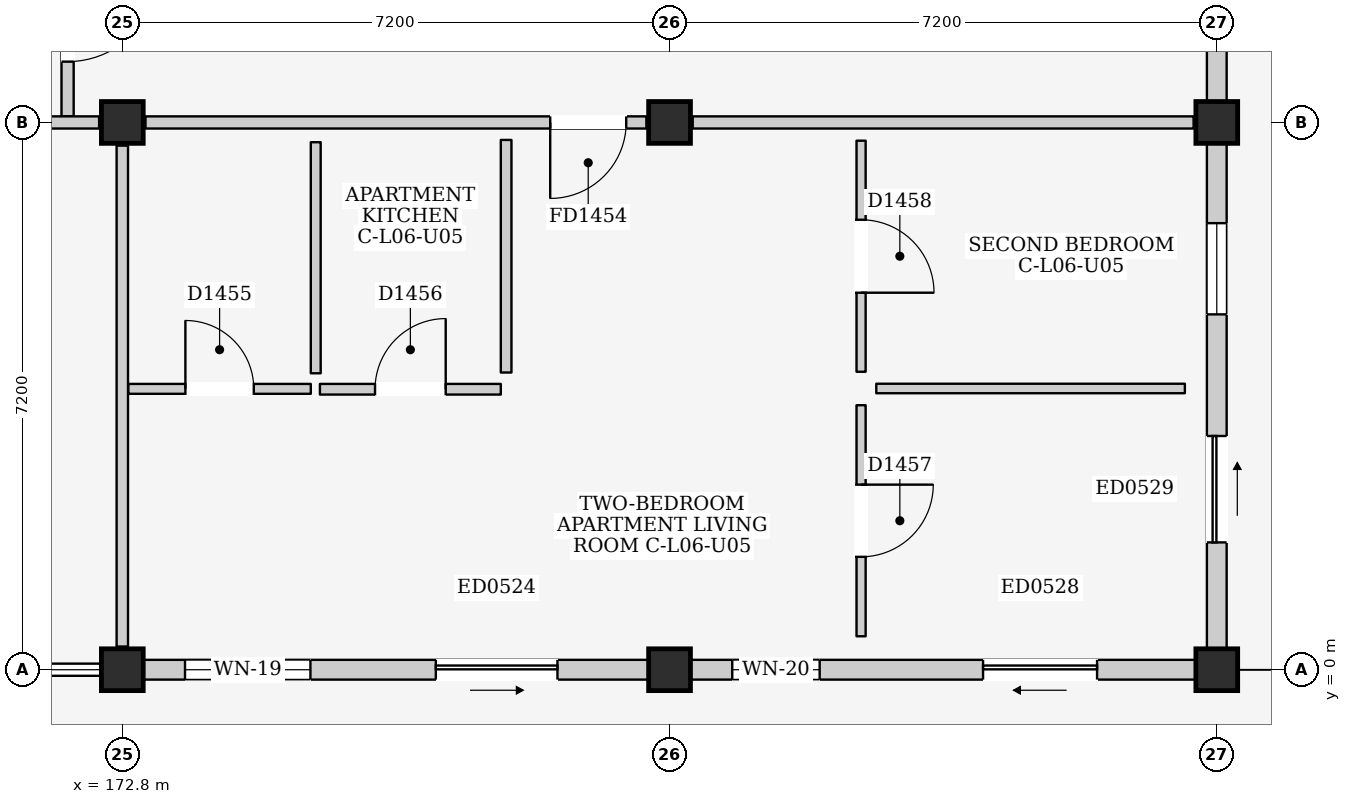
"""IFC4 building model, lengths in metres.
Left out: names, types, materials, properties, quantities, classifications, styles, units other than length and angle.
Written with IfcOpenShell. Run it as: python <this file> out.ifc"""

import sys

from ifc_helpers import new_model, si_unit, direction, frame, frame_2d, origin, origin_2d, place, context, subcontext, project, spatial, rectangle, extrude, element, fill, save


model = new_model("IFC4")
c1 = context("Model", 3, precision=1e-05, world=origin(), true_north=direction((0.0, 1.0)))
c2 = subcontext(c1, "Body", "Model", "MODEL_VIEW")
j1 = project(units=[si_unit("LENGTHUNIT", "METRE"), si_unit("PLANEANGLEUNIT", "RADIAN")], contexts=[c1])
p1 = place(None, origin())
s1 = spatial("IfcSite", under=j1, at=p1, CompositionType="ELEMENT")
p2 = place(p1, origin())
s2 = spatial("IfcBuilding", under=s1, at=p2, CompositionType="ELEMENT")
p3 = place(p2, frame((0.0, 0.0, 21.9)))
s3 = spatial("IfcBuildingStorey", under=s2, at=p3, CompositionType="ELEMENT", Elevation=21.9)
for number, where, z_axis, x_axis in (
    (1, (172.8, 0.0, 0.0), (0.0, 0.0, 1.0), (1.0, 0.0, 0.0)),
    (2, (172.8, 7.2, 0.0), (0.0, 0.0, 1.0), (1.0, 0.0, 0.0)),
    (3, (180.0, 0.0, 0.0), (0.0, 0.0, 1.0), (1.0, 0.0, 0.0)),
    (4, (180.0, 7.2, 0.0), (0.0, 0.0, 1.0), (1.0, 0.0, 0.0)),
    (5, (187.2, 0.0, 0.0), (0.0, 0.0, 1.0), (1.0, 0.0, 0.0)),
    (6, (187.2, 7.2, 0.0), (0.0, 0.0, 1.0), (1.0, 0.0, 0.0)),
):
    element("IfcColumn", number, at=place(p3, frame(where, z_axis=z_axis, x_axis=x_axis)), inside=s3, PredefinedType="COLUMN", context=c2, shape_type="SweptSolid", body=[
        extrude(rectangle(XDim=0.55, YDim=0.55, at=origin_2d()), origin(), (0.0, 0.0, 1.0), 3.2),
    ])
p4 = place(p3, frame((173.075, 0.0, 0.0), z_axis=(0.0, 0.0, 1.0), x_axis=(1.0, 0.0, 0.0)))
e7 = element("IfcWall", 7, at=p4, inside=s3, PredefinedType="ELEMENTEDWALL", context=c2, shape_type="SweptSolid", body=[
    extrude(rectangle(XDim=6.65, YDim=0.26, at=frame_2d((3.325, 0.0))), origin(), (0.0, 0.0, 1.0), 2.515),
])
p5 = place(p4, frame((3.85, 0.0, 0.0)))
e8 = element("IfcOpeningElement", 8, at=p5, cuts=e7, PredefinedType="OPENING", context=c2, shape_type="SweptSolid", body=[
    extrude(rectangle(XDim=1.6, YDim=2.12, at=frame_2d((0.8, 1.06))), frame((0.0, 0.145, 0.0), z_axis=(0.0, -1.0, 0.0), x_axis=(1.0, 0.0, 0.0)), (0.0, 0.0, 1.0), 0.29),
])
p6 = place(p4, frame((0.55, 0.0, 0.9)))
e9 = element("IfcOpeningElement", 9, at=p6, cuts=e7, PredefinedType="OPENING", context=c2, shape_type="SweptSolid", body=[
    extrude(rectangle(XDim=1.65, YDim=1.35, at=frame_2d((0.825, 0.675))), frame((0.0, 0.145, 0.0), z_axis=(0.0, -1.0, 0.0), x_axis=(1.0, 0.0, 0.0)), (0.0, 0.0, 1.0), 0.29),
])
p7 = place(p3, frame((180.275, 0.0, 0.0), z_axis=(0.0, 0.0, 1.0), x_axis=(1.0, 0.0, 0.0)))
e10 = element("IfcWall", 10, at=p7, inside=s3, PredefinedType="ELEMENTEDWALL", context=c2, shape_type="SweptSolid", body=[
    extrude(rectangle(XDim=6.65, YDim=0.26, at=frame_2d((3.325, 0.0))), origin(), (0.0, 0.0, 1.0), 2.515),
])
p8 = place(p7, frame((3.85, 0.0, 0.0)))
e11 = element("IfcOpeningElement", 11, at=p8, cuts=e10, PredefinedType="OPENING", context=c2, shape_type="SweptSolid", body=[
    extrude(rectangle(XDim=1.5, YDim=2.12, at=frame_2d((0.75, 1.06))), frame((0.0, 0.145, 0.0), z_axis=(0.0, -1.0, 0.0), x_axis=(1.0, 0.0, 0.0)), (0.0, 0.0, 1.0), 0.29),
])
p9 = place(p7, frame((0.55, 0.0, 0.9)))
e12 = element("IfcOpeningElement", 12, at=p9, cuts=e10, PredefinedType="OPENING", context=c2, shape_type="SweptSolid", body=[
    extrude(rectangle(XDim=1.15, YDim=1.15, at=frame_2d((0.575, 0.575))), frame((0.0, 0.145, 0.0), z_axis=(0.0, -1.0, 0.0), x_axis=(1.0, 0.0, 0.0)), (0.0, 0.0, 1.0), 0.29),
])
p10 = place(p3, frame((187.2, 0.275, 0.0), z_axis=(0.0, 0.0, 1.0), x_axis=(0.0, 1.0, 0.0)))
e13 = element("IfcWall", 13, at=p10, inside=s3, PredefinedType="ELEMENTEDWALL", context=c2, shape_type="SweptSolid", body=[
    extrude(rectangle(XDim=6.65, YDim=0.26, at=frame_2d((3.325, 0.0))), origin(), (0.0, 0.0, 1.0), 2.515),
])
p11 = place(p10, frame((1.4, 0.0, 0.0)))
e14 = element("IfcOpeningElement", 14, at=p11, cuts=e13, PredefinedType="OPENING", context=c2, shape_type="SweptSolid", body=[
    extrude(rectangle(XDim=1.4, YDim=2.1, at=frame_2d((0.7, 1.05))), frame((0.0, 0.145, 0.0), z_axis=(0.0, -1.0, 0.0), x_axis=(1.0, 0.0, 0.0)), (0.0, 0.0, 1.0), 0.29),
])
p12 = place(p10, frame((4.4, 0.0, 0.95)))
e15 = element("IfcOpeningElement", 15, at=p12, cuts=e13, PredefinedType="OPENING", context=c2, shape_type="SweptSolid", body=[
    extrude(rectangle(XDim=1.2, YDim=1.35, at=frame_2d((0.6, 0.675))), frame((0.0, 0.145, 0.0), z_axis=(0.0, -1.0, 0.0), x_axis=(1.0, 0.0, 0.0)), (0.0, 0.0, 1.0), 0.29),
])
p13 = place(p3, frame((187.2, 7.475, 0.0), z_axis=(0.0, 0.0, 1.0), x_axis=(0.0, 1.0, 0.0)))
e16 = element("IfcWall", 16, at=p13, inside=s3, PredefinedType="ELEMENTEDWALL", context=c2, shape_type="SweptSolid", body=[
    extrude(rectangle(XDim=6.65, YDim=0.26, at=frame_2d((3.325, 0.0))), origin(), (0.0, 0.0, 1.0), 2.515),
])
p14 = place(p13, frame((3.65, 0.0, 0.0)))
e17 = element("IfcOpeningElement", 17, at=p14, cuts=e16, PredefinedType="OPENING", context=c2, shape_type="SweptSolid", body=[
    extrude(rectangle(XDim=1.4, YDim=2.1, at=frame_2d((0.7, 1.05))), frame((0.0, 0.145, 0.0), z_axis=(0.0, -1.0, 0.0), x_axis=(1.0, 0.0, 0.0)), (0.0, 0.0, 1.0), 0.29),
])
p15 = place(p3, frame((172.08, 7.28, 0.0), z_axis=(0.0, 0.0, 1.0), x_axis=(0.0, 1.0, 0.0)))
e18 = element("IfcWall", 18, at=p15, inside=s3, PredefinedType="PARTITIONING", context=c2, shape_type="SweptSolid", body=[
    extrude(rectangle(XDim=4.32, YDim=0.16, at=frame_2d((2.16, 0.0))), origin(), (0.0, 0.0, 1.0), 2.98),
])
p16 = place(p15, frame((0.72, 0.0, 0.0)))
e19 = element("IfcOpeningElement", 19, at=p16, cuts=e18, PredefinedType="OPENING", context=c2, shape_type="SweptSolid", body=[
    extrude(rectangle(XDim=1.2, YDim=2.2, at=frame_2d((0.6, 1.1))), frame((0.0, 0.095, 0.0), z_axis=(0.0, -1.0, 0.0), x_axis=(1.0, 0.0, 0.0)), (0.0, 0.0, 1.0), 0.19),
])
p17 = place(p3, frame((165.905, 7.2, 0.0), z_axis=(0.0, 0.0, 1.0), x_axis=(1.0, 0.0, 0.0)))
e20 = element("IfcWall", 20, at=p17, inside=s3, PredefinedType="PARTITIONING", context=c2, shape_type="SweptSolid", body=[
    extrude(rectangle(XDim=6.59, YDim=0.16, at=frame_2d((3.295, 0.0))), origin(), (0.0, 0.0, 1.0), 2.365),
])
p18 = place(p17, frame((4.145, 0.0, 0.0)))
e21 = element("IfcOpeningElement", 21, at=p18, cuts=e20, PredefinedType="OPENING", context=c2, shape_type="SweptSolid", body=[
    extrude(rectangle(XDim=1.0, YDim=2.15, at=frame_2d((0.5, 1.075))), frame((0.0, 0.095, 0.0), z_axis=(0.0, -1.0, 0.0), x_axis=(1.0, 0.0, 0.0)), (0.0, 0.0, 1.0), 0.19),
])
p19 = place(p3, frame((172.8, 0.305, 0.0), z_axis=(0.0, 0.0, 1.0), x_axis=(0.0, 1.0, 0.0)))
e22 = element("IfcWall", 22, at=p19, inside=s3, PredefinedType="PARTITIONING", context=c2, shape_type="SweptSolid", body=[
    extrude(rectangle(XDim=6.59, YDim=0.15, at=frame_2d((3.295, 0.0))), origin(), (0.0, 0.0, 1.0), 2.465),
])
p20 = place(p3, frame((173.105, 7.2, 0.0), z_axis=(0.0, 0.0, 1.0), x_axis=(1.0, 0.0, 0.0)))
e23 = element("IfcWall", 23, at=p20, inside=s3, PredefinedType="PARTITIONING", context=c2, shape_type="SweptSolid", body=[
    extrude(rectangle(XDim=6.59, YDim=0.16, at=frame_2d((3.295, 0.0))), origin(), (0.0, 0.0, 1.0), 2.365),
])
p21 = place(p20, frame((5.325, 0.0, 0.0)))
e24 = element("IfcOpeningElement", 24, at=p21, cuts=e23, PredefinedType="OPENING", context=c2, shape_type="SweptSolid", body=[
    extrude(rectangle(XDim=1.0, YDim=2.15, at=frame_2d((0.5, 1.075))), frame((0.0, 0.095, 0.0), z_axis=(0.0, -1.0, 0.0), x_axis=(1.0, 0.0, 0.0)), (0.0, 0.0, 1.0), 0.19),
])
p22 = place(p3, frame((180.305, 7.2, 0.0), z_axis=(0.0, 0.0, 1.0), x_axis=(1.0, 0.0, 0.0)))
e25 = element("IfcWall", 25, at=p22, inside=s3, PredefinedType="PARTITIONING", context=c2, shape_type="SweptSolid", body=[
    extrude(rectangle(XDim=6.59, YDim=0.16, at=frame_2d((3.295, 0.0))), origin(), (0.0, 0.0, 1.0), 2.365),
])
p23 = place(p3, frame((172.88, 3.695, 0.0), z_axis=(0.0, 0.0, 1.0), x_axis=(1.0, 0.0, 0.0)))
e26 = element("IfcWall", 26, at=p23, inside=s3, PredefinedType="PARTITIONING", context=c2, shape_type="SweptSolid", body=[
    extrude(rectangle(XDim=2.4, YDim=0.13, at=frame_2d((1.2, 0.0))), origin(), (0.0, 0.0, 1.0), 2.98),
])
p24 = place(p23, frame((0.75, 0.0, 0.0)))
e27 = element("IfcOpeningElement", 27, at=p24, cuts=e26, PredefinedType="OPENING", context=c2, shape_type="SweptSolid", body=[
    extrude(rectangle(XDim=0.9, YDim=2.1, at=frame_2d((0.45, 1.05))), frame((0.0, 0.08, 0.0), z_axis=(0.0, -1.0, 0.0), x_axis=(1.0, 0.0, 0.0)), (0.0, 0.0, 1.0), 0.16),
])
p25 = place(p3, frame((175.345, 3.9, 0.0), z_axis=(0.0, 0.0, 1.0), x_axis=(0.0, 1.0, 0.0)))
e28 = element("IfcWall", 28, at=p25, inside=s3, PredefinedType="PARTITIONING", context=c2, shape_type="SweptSolid", body=[
    extrude(rectangle(XDim=3.04, YDim=0.13, at=frame_2d((1.52, 0.0))), origin(), (0.0, 0.0, 1.0), 2.98),
])
p26 = place(p3, frame((175.4, 3.69, 0.0), z_axis=(0.0, 0.0, 1.0), x_axis=(1.0, 0.0, 0.0)))
e29 = element("IfcWall", 29, at=p26, inside=s3, PredefinedType="PARTITIONING", context=c2, shape_type="SweptSolid", body=[
    extrude(rectangle(XDim=2.38, YDim=0.14, at=frame_2d((1.19, 0.0))), origin(), (0.0, 0.0, 1.0), 2.98),
])
p27 = place(p26, frame((0.725, 0.0, 0.0)))
e30 = element("IfcOpeningElement", 30, at=p27, cuts=e29, PredefinedType="OPENING", context=c2, shape_type="SweptSolid", body=[
    extrude(rectangle(XDim=0.93, YDim=2.14, at=frame_2d((0.465, 1.07))), frame((0.0, 0.085, 0.0), z_axis=(0.0, -1.0, 0.0), x_axis=(1.0, 0.0, 0.0)), (0.0, 0.0, 1.0), 0.17),
])
p28 = place(p3, frame((177.85, 3.91, 0.0), z_axis=(0.0, 0.0, 1.0), x_axis=(0.0, 1.0, 0.0)))
e31 = element("IfcWall", 31, at=p28, inside=s3, PredefinedType="PARTITIONING", context=c2, shape_type="SweptSolid", body=[
    extrude(rectangle(XDim=3.06, YDim=0.14, at=frame_2d((1.53, 0.0))), origin(), (0.0, 0.0, 1.0), 2.98),
])
p29 = place(p3, frame((182.52, 0.44, 0.0), z_axis=(0.0, 0.0, 1.0), x_axis=(0.0, 1.0, 0.0)))
e32 = element("IfcWall", 32, at=p29, inside=s3, PredefinedType="PARTITIONING", context=c2, shape_type="SweptSolid", body=[
    extrude(rectangle(XDim=3.04, YDim=0.12, at=frame_2d((1.52, 0.0))), origin(), (0.0, 0.0, 1.0), 2.98),
])
p30 = place(p29, frame((1.045, 0.0, 0.0)))
e33 = element("IfcOpeningElement", 33, at=p30, cuts=e32, PredefinedType="OPENING", context=c2, shape_type="SweptSolid", body=[
    extrude(rectangle(XDim=0.95, YDim=2.15, at=frame_2d((0.475, 1.075))), frame((0.0, 0.075, 0.0), z_axis=(0.0, -1.0, 0.0), x_axis=(1.0, 0.0, 0.0)), (0.0, 0.0, 1.0), 0.15),
])
p31 = place(p3, frame((182.72, 3.7, 0.0), z_axis=(0.0, 0.0, 1.0), x_axis=(1.0, 0.0, 0.0)))
e34 = element("IfcWall", 34, at=p31, inside=s3, PredefinedType="PARTITIONING", context=c2, shape_type="SweptSolid", body=[
    extrude(rectangle(XDim=4.06, YDim=0.125, at=frame_2d((2.03, 0.0))), origin(), (0.0, 0.0, 1.0), 2.98),
])
p32 = place(p3, frame((182.52, 3.92, 0.0), z_axis=(0.0, 0.0, 1.0), x_axis=(0.0, 1.0, 0.0)))
e35 = element("IfcWall", 35, at=p32, inside=s3, PredefinedType="PARTITIONING", context=c2, shape_type="SweptSolid", body=[
    extrude(rectangle(XDim=3.04, YDim=0.12, at=frame_2d((1.52, 0.0))), origin(), (0.0, 0.0, 1.0), 2.98),
])
p33 = place(p32, frame((1.04, 0.0, 0.0)))
e36 = element("IfcOpeningElement", 36, at=p33, cuts=e35, PredefinedType="OPENING", context=c2, shape_type="SweptSolid", body=[
    extrude(rectangle(XDim=0.96, YDim=2.15, at=frame_2d((0.48, 1.075))), frame((0.0, 0.075, 0.0), z_axis=(0.0, -1.0, 0.0), x_axis=(1.0, 0.0, 0.0)), (0.0, 0.0, 1.0), 0.15),
])
p34 = place(p5, frame((1.6, 0.0, 0.0), z_axis=(0.0, 0.0, 1.0), x_axis=(-1.0, 0.0, 0.0)))
e37 = element("IfcDoor", 37, at=p34, inside=s3, OperationType="SLIDING_TO_RIGHT", PredefinedType="DOOR", context=c2, shape_type="SweptSolid", body=[
    extrude(rectangle(XDim=1.6, YDim=2.12, at=frame_2d((0.8, 1.06))), frame((0.0, 0.025, 0.0), z_axis=(0.0, -1.0, 0.0), x_axis=(1.0, 0.0, 0.0)), (0.0, 0.0, 1.0), 0.05),
])
fill(e8, e37)
p35 = place(p6, origin())
e38 = element("IfcWindow", 38, at=p35, inside=s3, PartitioningType="DOUBLE_PANEL_VERTICAL", PredefinedType="WINDOW", context=c2, shape_type="SweptSolid", body=[
    extrude(rectangle(XDim=1.65, YDim=1.35, at=frame_2d((0.825, 0.675))), frame((0.0, 0.03, 0.0), z_axis=(0.0, -1.0, 0.0), x_axis=(1.0, 0.0, 0.0)), (0.0, 0.0, 1.0), 0.06),
])
fill(e9, e38)
p36 = place(p8, frame((1.5, 0.0, 0.0), z_axis=(0.0, 0.0, 1.0), x_axis=(-1.0, 0.0, 0.0)))
e39 = element("IfcDoor", 39, at=p36, inside=s3, OperationType="SLIDING_TO_LEFT", PredefinedType="DOOR", context=c2, shape_type="SweptSolid", body=[
    extrude(rectangle(XDim=1.5, YDim=2.12, at=frame_2d((0.75, 1.06))), frame((0.0, 0.025, 0.0), z_axis=(0.0, -1.0, 0.0), x_axis=(1.0, 0.0, 0.0)), (0.0, 0.0, 1.0), 0.05),
])
fill(e11, e39)
p37 = place(p9, origin())
e40 = element("IfcWindow", 40, at=p37, inside=s3, PartitioningType="SINGLE_PANEL", PredefinedType="WINDOW", context=c2, shape_type="SweptSolid", body=[
    extrude(rectangle(XDim=1.15, YDim=1.15, at=frame_2d((0.575, 0.575))), frame((0.0, 0.03, 0.0), z_axis=(0.0, -1.0, 0.0), x_axis=(1.0, 0.0, 0.0)), (0.0, 0.0, 1.0), 0.06),
])
fill(e12, e40)
p38 = place(p11, frame((1.4, 0.0, 0.0), z_axis=(0.0, 0.0, 1.0), x_axis=(-1.0, 0.0, 0.0)))
e41 = element("IfcDoor", 41, at=p38, inside=s3, OperationType="SLIDING_TO_RIGHT", PredefinedType="DOOR", context=c2, shape_type="SweptSolid", body=[
    extrude(rectangle(XDim=1.4, YDim=2.1, at=frame_2d((0.7, 1.05))), frame((0.0, 0.025, 0.0), z_axis=(0.0, -1.0, 0.0), x_axis=(1.0, 0.0, 0.0)), (0.0, 0.0, 1.0), 0.05),
])
fill(e14, e41)
p39 = place(p12, origin())
e42 = element("IfcWindow", 42, at=p39, inside=s3, PartitioningType="SINGLE_PANEL", PredefinedType="WINDOW", context=c2, shape_type="SweptSolid", body=[
    extrude(rectangle(XDim=1.2, YDim=1.35, at=frame_2d((0.6, 0.675))), frame((0.0, 0.03, 0.0), z_axis=(0.0, -1.0, 0.0), x_axis=(1.0, 0.0, 0.0)), (0.0, 0.0, 1.0), 0.06),
])
fill(e15, e42)
p40 = place(p16, frame((1.2, 0.0, 0.0), z_axis=(0.0, 0.0, 1.0), x_axis=(-1.0, 0.0, 0.0)))
e43 = element("IfcDoor", 43, at=p40, inside=s3, OperationType="SINGLE_SWING_LEFT", PredefinedType="DOOR", context=c2, shape_type="SweptSolid", body=[
    extrude(rectangle(XDim=1.2, YDim=2.2, at=frame_2d((0.6, 1.1))), frame((0.0, 0.025, 0.0), z_axis=(0.0, -1.0, 0.0), x_axis=(1.0, 0.0, 0.0)), (0.0, 0.0, 1.0), 0.05),
])
fill(e19, e43)
p41 = place(p21, frame((1.0, 0.0, 0.0), z_axis=(0.0, 0.0, 1.0), x_axis=(-1.0, 0.0, 0.0)))
e44 = element("IfcDoor", 44, at=p41, inside=s3, OperationType="SINGLE_SWING_RIGHT", PredefinedType="DOOR", context=c2, shape_type="SweptSolid", body=[
    extrude(rectangle(XDim=1.0, YDim=2.15, at=frame_2d((0.5, 1.075))), frame((0.0, 0.025, 0.0), z_axis=(0.0, -1.0, 0.0), x_axis=(1.0, 0.0, 0.0)), (0.0, 0.0, 1.0), 0.05),
])
fill(e24, e44)
p42 = place(p24, origin())
e45 = element("IfcDoor", 45, at=p42, inside=s3, OperationType="SINGLE_SWING_LEFT", PredefinedType="DOOR", context=c2, shape_type="SweptSolid", body=[
    extrude(rectangle(XDim=0.9, YDim=2.1, at=frame_2d((0.45, 1.05))), frame((0.0, 0.025, 0.0), z_axis=(0.0, -1.0, 0.0), x_axis=(1.0, 0.0, 0.0)), (0.0, 0.0, 1.0), 0.05),
])
fill(e27, e45)
p43 = place(p27, origin())
e46 = element("IfcDoor", 46, at=p43, inside=s3, OperationType="SINGLE_SWING_RIGHT", PredefinedType="DOOR", context=c2, shape_type="SweptSolid", body=[
    extrude(rectangle(XDim=0.93, YDim=2.14, at=frame_2d((0.465, 1.07))), frame((0.0, 0.025, 0.0), z_axis=(0.0, -1.0, 0.0), x_axis=(1.0, 0.0, 0.0)), (0.0, 0.0, 1.0), 0.05),
])
fill(e30, e46)
p44 = place(p30, frame((0.95, 0.0, 0.0), z_axis=(0.0, 0.0, 1.0), x_axis=(-1.0, 0.0, 0.0)))
e47 = element("IfcDoor", 47, at=p44, inside=s3, OperationType="SINGLE_SWING_LEFT", PredefinedType="DOOR", context=c2, shape_type="SweptSolid", body=[
    extrude(rectangle(XDim=0.95, YDim=2.15, at=frame_2d((0.475, 1.075))), frame((0.0, 0.025, 0.0), z_axis=(0.0, -1.0, 0.0), x_axis=(1.0, 0.0, 0.0)), (0.0, 0.0, 1.0), 0.05),
])
fill(e33, e47)
p45 = place(p33, frame((0.96, 0.0, 0.0), z_axis=(0.0, 0.0, 1.0), x_axis=(-1.0, 0.0, 0.0)))
e48 = element("IfcDoor", 48, at=p45, inside=s3, OperationType="SINGLE_SWING_RIGHT", PredefinedType="DOOR", context=c2, shape_type="SweptSolid", body=[
    extrude(rectangle(XDim=0.96, YDim=2.15, at=frame_2d((0.48, 1.075))), frame((0.0, 0.025, 0.0), z_axis=(0.0, -1.0, 0.0), x_axis=(1.0, 0.0, 0.0)), (0.0, 0.0, 1.0), 0.05),
])
fill(e36, e48)
save(model, sys.argv[1])
